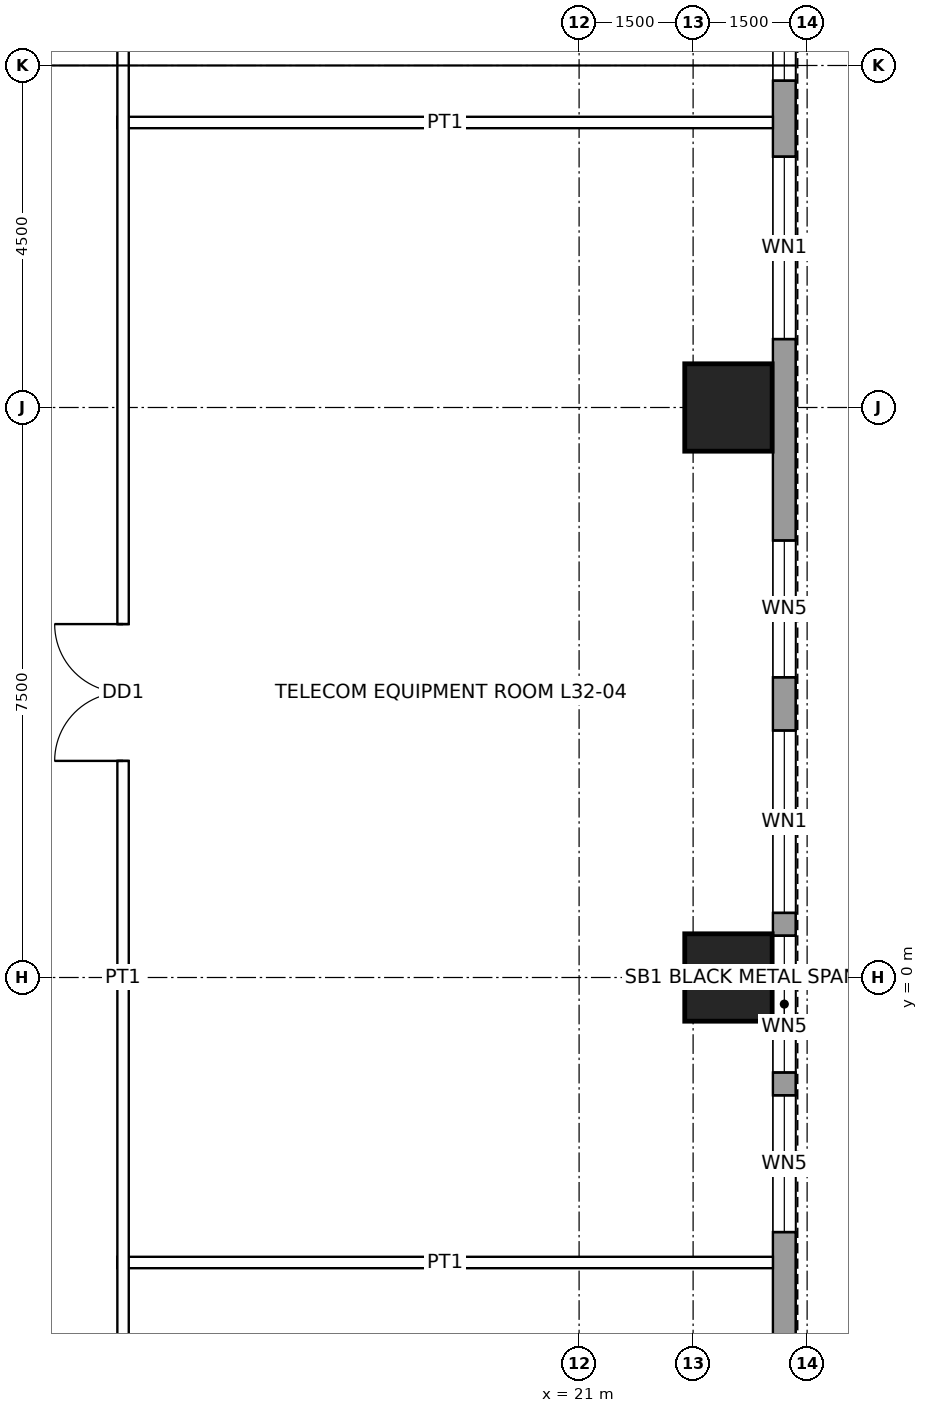
"""IFC4 building model, lengths in metres.
Left out: names, types, materials, properties, quantities, classifications, styles, units other than length and angle.
Written with IfcOpenShell. Run it as: python <this file> out.ifc"""

import sys

from ifc_helpers import new_model, si_unit, direction, frame, frame_2d, origin, origin_2d, place, context, subcontext, project, spatial, rectangle, hollow_rectangle, extrude, element, fill, save


model = new_model("IFC4")
c1 = context("Model", 3, precision=1e-05, world=origin(), true_north=direction((0.0, 1.0)))
c2 = subcontext(c1, "Body", "Model", "MODEL_VIEW")
j1 = project(units=[si_unit("LENGTHUNIT", "METRE"), si_unit("PLANEANGLEUNIT", "RADIAN")], contexts=[c1])
p1 = place(None, origin())
s1 = spatial("IfcSite", under=j1, at=p1, CompositionType="ELEMENT")
p2 = place(p1, origin())
s2 = spatial("IfcBuilding", under=s1, at=p2, CompositionType="ELEMENT")
p3 = place(p2, frame((0.0, 0.0, 158.4)))
s3 = spatial("IfcBuildingStorey", under=s2, at=p3, CompositionType="ELEMENT", Elevation=158.4)
for number, where, z_axis, x_axis in (
    (1, (22.965, 7.5, 0.0), (0.0, 0.0, 1.0), (1.0, 0.0, 0.0)),
    (2, (22.965, 0.0, 0.0), (0.0, 0.0, 1.0), (1.0, 0.0, 0.0)),
):
    element("IfcColumn", number, at=place(p3, frame(where, z_axis=z_axis, x_axis=x_axis)), inside=s3, PredefinedType="COLUMN", context=c2, shape_type="SweptSolid", body=[
        extrude(hollow_rectangle(XDim=1.15, YDim=1.15, WallThickness=0.075, at=origin_2d()), origin(), (0.0, 0.0, 1.0), 4.5),
    ])
p4 = place(p3, frame((23.7, 16.2, 0.0), z_axis=(0.0, 0.0, 1.0), x_axis=(0.0, -1.0, 0.0)))
e3 = element("IfcWall", 3, at=p4, inside=s3, PredefinedType="SOLIDWALL", context=c2, shape_type="SweptSolid", body=[
    extrude(rectangle(XDim=32.4, YDim=0.3, at=frame_2d((16.2, 0.0))), origin(), (0.0, 0.0, 1.0), 4.3),
])
p5 = place(p4, frame((2.0, 0.0, 1.0)))
e4 = element("IfcOpeningElement", 4, at=p5, cuts=e3, PredefinedType="OPENING", context=c2, shape_type="SweptSolid", body=[
    extrude(rectangle(XDim=2.4, YDim=1.2, at=frame_2d((1.2, 0.6))), frame((0.0, 0.16, 0.0), z_axis=(0.0, -1.0, 0.0), x_axis=(1.0, 0.0, 0.0)), (0.0, 0.0, 1.0), 0.32),
])
p6 = place(p4, frame((5.4, 0.0, 1.0)))
e5 = element("IfcOpeningElement", 5, at=p6, cuts=e3, PredefinedType="OPENING", context=c2, shape_type="SweptSolid", body=[
    extrude(rectangle(XDim=2.4, YDim=1.2, at=frame_2d((1.2, 0.6))), frame((0.0, 0.16, 0.0), z_axis=(0.0, -1.0, 0.0), x_axis=(1.0, 0.0, 0.0)), (0.0, 0.0, 1.0), 0.32),
])
p7 = place(p4, frame((10.45, 0.0, 1.0)))
e6 = element("IfcOpeningElement", 6, at=p7, cuts=e3, PredefinedType="OPENING", context=c2, shape_type="SweptSolid", body=[
    extrude(rectangle(XDim=1.8, YDim=1.2, at=frame_2d((0.9, 0.6))), frame((0.0, 0.16, 0.0), z_axis=(0.0, -1.0, 0.0), x_axis=(1.0, 0.0, 0.0)), (0.0, 0.0, 1.0), 0.32),
])
p8 = place(p4, frame((12.95, 0.0, 1.0)))
e7 = element("IfcOpeningElement", 7, at=p8, cuts=e3, PredefinedType="OPENING", context=c2, shape_type="SweptSolid", body=[
    extrude(rectangle(XDim=2.4, YDim=1.2, at=frame_2d((1.2, 0.6))), frame((0.0, 0.16, 0.0), z_axis=(0.0, -1.0, 0.0), x_axis=(1.0, 0.0, 0.0)), (0.0, 0.0, 1.0), 0.32),
])
p9 = place(p4, frame((15.65, 0.0, 1.0)))
e8 = element("IfcOpeningElement", 8, at=p9, cuts=e3, PredefinedType="OPENING", context=c2, shape_type="SweptSolid", body=[
    extrude(rectangle(XDim=1.8, YDim=1.2, at=frame_2d((0.9, 0.6))), frame((0.0, 0.16, 0.0), z_axis=(0.0, -1.0, 0.0), x_axis=(1.0, 0.0, 0.0)), (0.0, 0.0, 1.0), 0.32),
])
p10 = place(p4, frame((17.75, 0.0, 1.0)))
e9 = element("IfcOpeningElement", 9, at=p10, cuts=e3, PredefinedType="OPENING", context=c2, shape_type="SweptSolid", body=[
    extrude(rectangle(XDim=1.8, YDim=1.2, at=frame_2d((0.9, 0.6))), frame((0.0, 0.16, 0.0), z_axis=(0.0, -1.0, 0.0), x_axis=(1.0, 0.0, 0.0)), (0.0, 0.0, 1.0), 0.32),
])
p11 = place(p4, frame((24.6, 0.0, 1.0)))
e10 = element("IfcOpeningElement", 10, at=p11, cuts=e3, PredefinedType="OPENING", context=c2, shape_type="SweptSolid", body=[
    extrude(rectangle(XDim=2.4, YDim=1.2, at=frame_2d((1.2, 0.6))), frame((0.0, 0.16, 0.0), z_axis=(0.0, -1.0, 0.0), x_axis=(1.0, 0.0, 0.0)), (0.0, 0.0, 1.0), 0.32),
])
p12 = place(p4, frame((28.0, 0.0, 1.0)))
e11 = element("IfcOpeningElement", 11, at=p12, cuts=e3, PredefinedType="OPENING", context=c2, shape_type="SweptSolid", body=[
    extrude(rectangle(XDim=2.4, YDim=1.2, at=frame_2d((1.2, 0.6))), frame((0.0, 0.16, 0.0), z_axis=(0.0, -1.0, 0.0), x_axis=(1.0, 0.0, 0.0)), (0.0, 0.0, 1.0), 0.32),
])
for number, where, z_axis, x_axis in (
    (12, (14.925, -3.75, 0.0), (0.0, 0.0, 1.0), (1.0, 0.0, 0.0)),
    (13, (14.925, 11.25, 0.0), (0.0, 0.0, 1.0), (1.0, 0.0, 0.0)),
):
    element("IfcWall", number, at=place(p3, frame(where, z_axis=z_axis, x_axis=x_axis)), inside=s3, PredefinedType="PARTITIONING", context=c2, shape_type="SweptSolid", body=[
        extrude(rectangle(XDim=8.625, YDim=0.15, at=frame_2d((4.312, 0.0))), origin(), (0.0, 0.0, 1.0), 3.431),
    ])
p13 = place(p3, frame((15.0, -15.075, 0.0), z_axis=(0.0, 0.0, 1.0), x_axis=(0.0, 1.0, 0.0)))
e14 = element("IfcWall", 14, at=p13, inside=s3, PredefinedType="PARTITIONING", context=c2, shape_type="SweptSolid", body=[
    extrude(rectangle(XDim=30.15, YDim=0.15, at=frame_2d((15.075, 0.0))), origin(), (0.0, 0.0, 1.0), 4.3),
])
p14 = place(p13, frame((17.925, 0.0, 0.0)))
e15 = element("IfcOpeningElement", 15, at=p14, cuts=e14, PredefinedType="OPENING", context=c2, shape_type="SweptSolid", body=[
    extrude(rectangle(XDim=1.8, YDim=2.4, at=frame_2d((0.9, 1.2))), frame((0.0, 0.085, 0.0), z_axis=(0.0, -1.0, 0.0), x_axis=(1.0, 0.0, 0.0)), (0.0, 0.0, 1.0), 0.17),
])
p15 = place(p13, frame((6.675, 0.0, 0.0)))
e16 = element("IfcOpeningElement", 16, at=p15, cuts=e14, PredefinedType="OPENING", context=c2, shape_type="SweptSolid", body=[
    extrude(rectangle(XDim=1.8, YDim=2.4, at=frame_2d((0.9, 1.2))), frame((0.0, 0.085, 0.0), z_axis=(0.0, -1.0, 0.0), x_axis=(1.0, 0.0, 0.0)), (0.0, 0.0, 1.0), 0.17),
])
p16 = place(p5, origin())
e17 = element("IfcWindow", 17, at=p16, inside=s3, PartitioningType="SINGLE_PANEL", PredefinedType="WINDOW", context=c2, shape_type="SweptSolid", body=[
    extrude(rectangle(XDim=2.4, YDim=1.2, at=frame_2d((1.2, 0.6))), frame((0.0, 0.03, 0.0), z_axis=(0.0, -1.0, 0.0), x_axis=(1.0, 0.0, 0.0)), (0.0, 0.0, 1.0), 0.06),
])
fill(e4, e17)
p17 = place(p6, origin())
e18 = element("IfcWindow", 18, at=p17, inside=s3, PartitioningType="SINGLE_PANEL", PredefinedType="WINDOW", context=c2, shape_type="SweptSolid", body=[
    extrude(rectangle(XDim=2.4, YDim=1.2, at=frame_2d((1.2, 0.6))), frame((0.0, 0.03, 0.0), z_axis=(0.0, -1.0, 0.0), x_axis=(1.0, 0.0, 0.0)), (0.0, 0.0, 1.0), 0.06),
])
fill(e5, e18)
p18 = place(p7, origin())
e19 = element("IfcWindow", 19, at=p18, inside=s3, PartitioningType="SINGLE_PANEL", PredefinedType="WINDOW", context=c2, shape_type="SweptSolid", body=[
    extrude(rectangle(XDim=1.8, YDim=1.2, at=frame_2d((0.9, 0.6))), frame((0.0, 0.03, 0.0), z_axis=(0.0, -1.0, 0.0), x_axis=(1.0, 0.0, 0.0)), (0.0, 0.0, 1.0), 0.06),
])
fill(e6, e19)
p19 = place(p8, origin())
e20 = element("IfcWindow", 20, at=p19, inside=s3, PartitioningType="SINGLE_PANEL", PredefinedType="WINDOW", context=c2, shape_type="SweptSolid", body=[
    extrude(rectangle(XDim=2.4, YDim=1.2, at=frame_2d((1.2, 0.6))), frame((0.0, 0.03, 0.0), z_axis=(0.0, -1.0, 0.0), x_axis=(1.0, 0.0, 0.0)), (0.0, 0.0, 1.0), 0.06),
])
fill(e7, e20)
p20 = place(p9, origin())
e21 = element("IfcWindow", 21, at=p20, inside=s3, PartitioningType="SINGLE_PANEL", PredefinedType="WINDOW", context=c2, shape_type="SweptSolid", body=[
    extrude(rectangle(XDim=1.8, YDim=1.2, at=frame_2d((0.9, 0.6))), frame((0.0, 0.03, 0.0), z_axis=(0.0, -1.0, 0.0), x_axis=(1.0, 0.0, 0.0)), (0.0, 0.0, 1.0), 0.06),
])
fill(e8, e21)
p21 = place(p10, origin())
e22 = element("IfcWindow", 22, at=p21, inside=s3, PartitioningType="SINGLE_PANEL", PredefinedType="WINDOW", context=c2, shape_type="SweptSolid", body=[
    extrude(rectangle(XDim=1.8, YDim=1.2, at=frame_2d((0.9, 0.6))), frame((0.0, 0.03, 0.0), z_axis=(0.0, -1.0, 0.0), x_axis=(1.0, 0.0, 0.0)), (0.0, 0.0, 1.0), 0.06),
])
fill(e9, e22)
p22 = place(p14, origin())
e23 = element("IfcDoor", 23, at=p22, inside=s3, OperationType="DOUBLE_DOOR_SINGLE_SWING", PredefinedType="DOOR", context=c2, shape_type="SweptSolid", body=[
    extrude(rectangle(XDim=1.8, YDim=2.4, at=frame_2d((0.9, 1.2))), frame((0.0, 0.025, 0.0), z_axis=(0.0, -1.0, 0.0), x_axis=(1.0, 0.0, 0.0)), (0.0, 0.0, 1.0), 0.05),
])
fill(e15, e23)
save(model, sys.argv[1])
